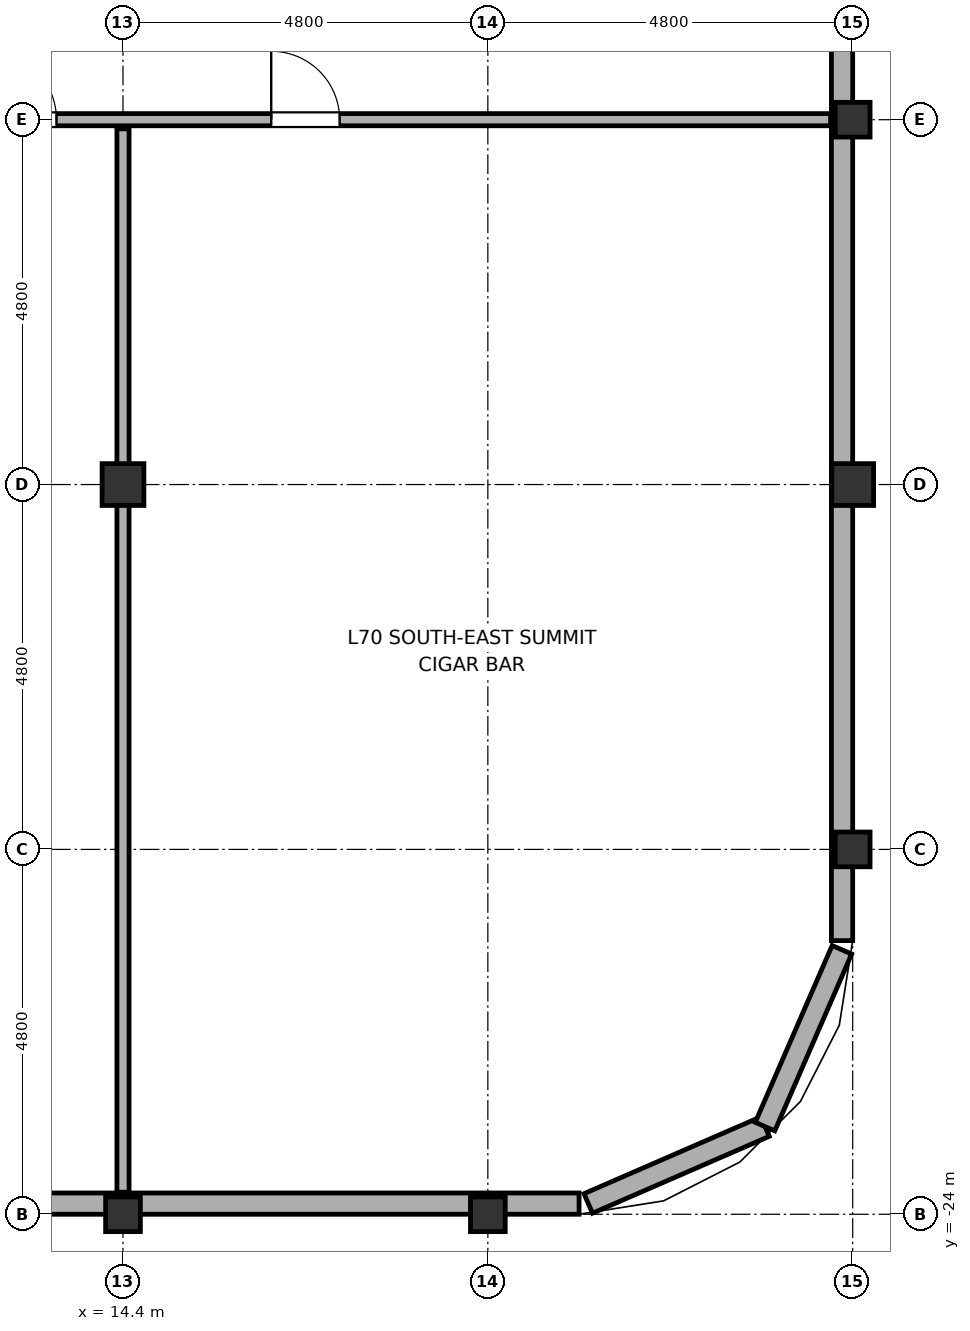
"""IFC4 building model, lengths in metres.
Left out: names, types, materials, properties, quantities, classifications, styles, units other than length and angle.
Written with IfcOpenShell. Run it as: python <this file> out.ifc"""

import sys

from ifc_helpers import new_model, si_unit, direction, frame, frame_2d, origin, origin_2d, place, context, subcontext, project, spatial, rectangle, hollow_rectangle, hollow_circle, extrude, element, fill, save


model = new_model("IFC4")
c1 = context("Model", 3, precision=1e-05, world=origin(), true_north=direction((0.0, 1.0)))
c2 = subcontext(c1, "Body", "Model", "MODEL_VIEW")
j1 = project(units=[si_unit("LENGTHUNIT", "METRE"), si_unit("PLANEANGLEUNIT", "RADIAN")], contexts=[c1])
p1 = place(None, origin())
s1 = spatial("IfcSite", under=j1, at=p1, CompositionType="ELEMENT")
p2 = place(p1, origin())
s2 = spatial("IfcBuilding", under=s1, at=p2, CompositionType="ELEMENT")
p3 = place(p2, frame((0.0, 0.0, 282.2)))
s3 = spatial("IfcBuildingStorey", under=s2, at=p3, CompositionType="ELEMENT", Elevation=282.2)
p4 = place(p3, frame((14.4, -24.0, -0.2), z_axis=(0.0, 0.0, 1.0), x_axis=(1.0, 0.0, 0.0)))
e1 = element("IfcColumn", 1, at=p4, inside=s3, PredefinedType="COLUMN", context=c2, shape_type="SweptSolid", body=[
    extrude(hollow_circle(Radius=0.229, WallThickness=0.02, at=origin_2d()), origin(), (0.0, 0.0, 1.0), 4.4),
])
p5 = place(p3, frame((14.4, -14.4, 0.0), z_axis=(0.0, 0.0, 1.0), x_axis=(1.0, 0.0, 0.0)))
e2 = element("IfcColumn", 2, at=p5, inside=s3, PredefinedType="COLUMN", context=c2, shape_type="SweptSolid", body=[
    extrude(hollow_rectangle(XDim=0.55, YDim=0.55, WallThickness=0.025, at=origin_2d()), origin(), (0.0, 0.0, 1.0), 4.2),
])
p6 = place(p3, frame((19.2, -24.0, -0.2), z_axis=(0.0, 0.0, 1.0), x_axis=(1.0, 0.0, 0.0)))
e3 = element("IfcColumn", 3, at=p6, inside=s3, PredefinedType="COLUMN", context=c2, shape_type="SweptSolid", body=[
    extrude(hollow_circle(Radius=0.229, WallThickness=0.02, at=origin_2d()), origin(), (0.0, 0.0, 1.0), 4.4),
])
p7 = place(p3, frame((24.0, -19.2, 0.0), z_axis=(0.0, 0.0, 1.0), x_axis=(1.0, 0.0, 0.0)))
e4 = element("IfcColumn", 4, at=p7, inside=s3, PredefinedType="COLUMN", context=c2, shape_type="SweptSolid", body=[
    extrude(hollow_circle(Radius=0.229, WallThickness=0.02, at=origin_2d()), origin(), (0.0, 0.0, 1.0), 4.2),
])
p8 = place(p3, frame((24.0, -14.4, 0.0), z_axis=(0.0, 0.0, 1.0), x_axis=(1.0, 0.0, 0.0)))
e5 = element("IfcColumn", 5, at=p8, inside=s3, PredefinedType="COLUMN", context=c2, shape_type="SweptSolid", body=[
    extrude(hollow_rectangle(XDim=0.55, YDim=0.55, WallThickness=0.025, at=origin_2d()), origin(), (0.0, 0.0, 1.0), 4.2),
])
p9 = place(p3, frame((24.0, -9.6, 0.0), z_axis=(0.0, 0.0, 1.0), x_axis=(1.0, 0.0, 0.0)))
e6 = element("IfcColumn", 6, at=p9, inside=s3, PredefinedType="COLUMN", context=c2, shape_type="SweptSolid", body=[
    extrude(hollow_circle(Radius=0.229, WallThickness=0.02, at=origin_2d()), origin(), (0.0, 0.0, 1.0), 4.2),
])
for number, where, z_axis, x_axis in (
    (7, (20.521, -23.858, 0.0), (0.0, 0.0, 1.0), (0.917, 0.399, 0.0)),
    (8, (22.847, -22.847, 0.0), (0.0, 0.0, 1.0), (0.399, 0.917, 0.0)),
):
    element("IfcWall", number, at=place(p3, frame(where, z_axis=z_axis, x_axis=x_axis)), inside=s3, PredefinedType="SOLIDWALL", context=c2, shape_type="SweptSolid", body=[
        extrude(rectangle(XDim=2.536, YDim=0.28, at=frame_2d((1.268, 0.0))), origin(), (0.0, 0.0, 1.0), 2.6),
    ])
p10 = place(p3, frame((4.75, -23.86, 0.0), z_axis=(0.0, 0.0, 1.0), x_axis=(1.0, 0.0, 0.0)))
e9 = element("IfcWall", 9, at=p10, inside=s3, PredefinedType="SOLIDWALL", context=c2, shape_type="SweptSolid", body=[
    extrude(rectangle(XDim=15.65, YDim=0.28, at=frame_2d((7.825, 0.0))), origin(), (0.0, 0.0, 1.0), 2.6),
])
p11 = place(p10, frame((1.01, 0.0, 0.75)))
e10 = element("IfcOpeningElement", 10, at=p11, cuts=e9, PredefinedType="OPENING", context=c2, shape_type="SweptSolid", body=[
    extrude(rectangle(XDim=2.8, YDim=1.7, at=frame_2d((1.4, 0.85))), frame((0.0, 0.155, 0.0), z_axis=(0.0, -1.0, 0.0), x_axis=(1.0, 0.0, 0.0)), (0.0, 0.0, 1.0), 0.31),
])
p12 = place(p10, frame((5.85, 0.0, 0.75)))
e11 = element("IfcOpeningElement", 11, at=p12, cuts=e9, PredefinedType="OPENING", context=c2, shape_type="SweptSolid", body=[
    extrude(rectangle(XDim=2.8, YDim=1.7, at=frame_2d((1.4, 0.85))), frame((0.0, 0.155, 0.0), z_axis=(0.0, -1.0, 0.0), x_axis=(1.0, 0.0, 0.0)), (0.0, 0.0, 1.0), 0.31),
])
p13 = place(p3, frame((23.86, -20.4, 0.0), z_axis=(0.0, 0.0, 1.0), x_axis=(0.0, 1.0, 0.0)))
e12 = element("IfcWall", 12, at=p13, inside=s3, PredefinedType="SOLIDWALL", context=c2, shape_type="SweptSolid", body=[
    extrude(rectangle(XDim=20.38, YDim=0.28, at=frame_2d((10.19, 0.0))), origin(), (0.0, 0.0, 1.0), 2.6),
])
p14 = place(p3, frame((-28.51, -9.6, 0.0), z_axis=(0.0, 0.0, 1.0), x_axis=(1.0, 0.0, 0.0)))
e13 = element("IfcWall", 13, at=p14, inside=s3, PredefinedType="PARTITIONING", context=c2, shape_type="SweptSolid", body=[
    extrude(rectangle(XDim=52.22, YDim=0.16, at=frame_2d((26.11, 0.0))), origin(), (0.0, 0.0, 1.0), 3.56),
])
p15 = place(p14, frame((6.46, 0.0, 0.0)))
e14 = element("IfcOpeningElement", 14, at=p15, cuts=e13, PredefinedType="OPENING", context=c2, shape_type="SweptSolid", body=[
    extrude(rectangle(XDim=0.9, YDim=2.1, at=frame_2d((0.45, 1.05))), frame((0.0, 0.095, 0.0), z_axis=(0.0, -1.0, 0.0), x_axis=(1.0, 0.0, 0.0)), (0.0, 0.0, 1.0), 0.19),
])
p16 = place(p14, frame((44.86, 0.0, 0.0)))
e15 = element("IfcOpeningElement", 15, at=p16, cuts=e13, PredefinedType="OPENING", context=c2, shape_type="SweptSolid", body=[
    extrude(rectangle(XDim=0.9, YDim=2.1, at=frame_2d((0.45, 1.05))), frame((0.0, 0.095, 0.0), z_axis=(0.0, -1.0, 0.0), x_axis=(1.0, 0.0, 0.0)), (0.0, 0.0, 1.0), 0.19),
])
p17 = place(p14, frame((11.225, 0.0, 0.0)))
e16 = element("IfcOpeningElement", 16, at=p17, cuts=e13, PredefinedType="OPENING", context=c2, shape_type="SweptSolid", body=[
    extrude(rectangle(XDim=1.05, YDim=2.2, at=frame_2d((0.525, 1.1))), frame((0.0, 0.095, 0.0), z_axis=(0.0, -1.0, 0.0), x_axis=(1.0, 0.0, 0.0)), (0.0, 0.0, 1.0), 0.19),
])
p18 = place(p14, frame((20.825, 0.0, 0.0)))
e17 = element("IfcOpeningElement", 17, at=p18, cuts=e13, PredefinedType="OPENING", context=c2, shape_type="SweptSolid", body=[
    extrude(rectangle(XDim=1.05, YDim=2.2, at=frame_2d((0.525, 1.1))), frame((0.0, 0.095, 0.0), z_axis=(0.0, -1.0, 0.0), x_axis=(1.0, 0.0, 0.0)), (0.0, 0.0, 1.0), 0.19),
])
p19 = place(p14, frame((30.425, 0.0, 0.0)))
e18 = element("IfcOpeningElement", 18, at=p19, cuts=e13, PredefinedType="OPENING", context=c2, shape_type="SweptSolid", body=[
    extrude(rectangle(XDim=1.05, YDim=2.2, at=frame_2d((0.525, 1.1))), frame((0.0, 0.095, 0.0), z_axis=(0.0, -1.0, 0.0), x_axis=(1.0, 0.0, 0.0)), (0.0, 0.0, 1.0), 0.19),
])
p20 = place(p14, frame((41.115, 0.0, 0.0)))
e19 = element("IfcOpeningElement", 19, at=p20, cuts=e13, PredefinedType="OPENING", context=c2, shape_type="SweptSolid", body=[
    extrude(rectangle(XDim=0.92, YDim=2.15, at=frame_2d((0.46, 1.075))), frame((0.0, 0.095, 0.0), z_axis=(0.0, -1.0, 0.0), x_axis=(1.0, 0.0, 0.0)), (0.0, 0.0, 1.0), 0.19),
])
p21 = place(p3, frame((14.4, -23.71, 0.0), z_axis=(0.0, 0.0, 1.0), x_axis=(0.0, 1.0, 0.0)))
e20 = element("IfcWall", 20, at=p21, inside=s3, PredefinedType="PARTITIONING", context=c2, shape_type="SweptSolid", body=[
    extrude(rectangle(XDim=13.99, YDim=0.16, at=frame_2d((6.995, 0.0))), origin(), (0.0, 0.0, 1.0), 2.6),
])
p22 = place(p16, origin())
e21 = element("IfcDoor", 21, at=p22, inside=s3, OperationType="SINGLE_SWING_LEFT", PredefinedType="DOOR", context=c2, shape_type="SweptSolid", body=[
    extrude(rectangle(XDim=0.9, YDim=2.1, at=frame_2d((0.45, 1.05))), frame((0.0, 0.025, 0.0), z_axis=(0.0, -1.0, 0.0), x_axis=(1.0, 0.0, 0.0)), (0.0, 0.0, 1.0), 0.05),
])
fill(e15, e21)
p23 = place(p20, origin())
e22 = element("IfcDoor", 22, at=p23, inside=s3, OperationType="SINGLE_SWING_LEFT", PredefinedType="DOOR", context=c2, shape_type="SweptSolid", body=[
    extrude(rectangle(XDim=0.92, YDim=2.15, at=frame_2d((0.46, 1.075))), frame((0.0, 0.025, 0.0), z_axis=(0.0, -1.0, 0.0), x_axis=(1.0, 0.0, 0.0)), (0.0, 0.0, 1.0), 0.05),
])
fill(e19, e22)
save(model, sys.argv[1])
